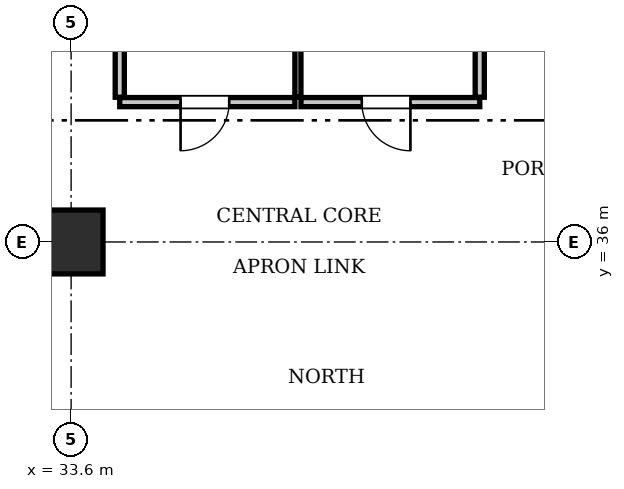
"""IFC4 building model, lengths in metres.
Left out: names, types, materials, properties, quantities, classifications, styles, units other than length and angle.
Written with IfcOpenShell. Run it as: python <this file> out.ifc"""

import sys

from ifc_helpers import new_model, si_unit, direction, frame, frame_2d, origin, origin_2d, place, context, subcontext, project, spatial, rectangle, extrude, element, fill, save


model = new_model("IFC4")
c1 = context("Model", 3, precision=1e-05, world=origin(), true_north=direction((0.0, 1.0)))
c2 = subcontext(c1, "Body", "Model", "MODEL_VIEW")
j1 = project(units=[si_unit("LENGTHUNIT", "METRE"), si_unit("PLANEANGLEUNIT", "RADIAN")], contexts=[c1])
p1 = place(None, origin())
s1 = spatial("IfcSite", under=j1, at=p1, CompositionType="ELEMENT")
p2 = place(p1, origin())
s2 = spatial("IfcBuilding", under=s1, at=p2, CompositionType="ELEMENT")
p3 = place(p2, frame((0.0, 0.0, 61.6)))
s3 = spatial("IfcBuildingStorey", under=s2, at=p3, CompositionType="ELEMENT", Elevation=61.6)
p4 = place(p3, frame((33.6, 36.0, 0.0), z_axis=(0.0, 0.0, 1.0), x_axis=(1.0, 0.0, 0.0)))
e1 = element("IfcColumn", 1, at=p4, inside=s3, PredefinedType="COLUMN", context=c2, shape_type="SweptSolid", body=[
    extrude(rectangle(XDim=1.05, YDim=1.05, at=origin_2d()), origin(), (0.0, 0.0, 1.0), 3.85),
])
p5 = place(p3, frame((34.4, 38.3, 0.0), z_axis=(0.0, 0.0, 1.0), x_axis=(1.0, 0.0, 0.0)))
e2 = element("IfcWall", 2, at=p5, inside=s3, PredefinedType="PARTITIONING", context=c2, shape_type="SweptSolid", body=[
    extrude(rectangle(XDim=2.88, YDim=0.15, at=frame_2d((1.44, 0.0))), origin(), (0.0, 0.0, 1.0), 3.61),
])
p6 = place(p5, frame((1.0, 0.0, 0.0)))
e3 = element("IfcOpeningElement", 3, at=p6, cuts=e2, PredefinedType="OPENING", context=c2, shape_type="SweptSolid", body=[
    extrude(rectangle(XDim=0.8, YDim=2.05, at=frame_2d((0.4, 1.025))), frame((0.0, 0.085, 0.0), z_axis=(0.0, -1.0, 0.0), x_axis=(1.0, 0.0, 0.0)), (0.0, 0.0, 1.0), 0.17),
])
p7 = place(p3, frame((37.38, 38.3, 0.0), z_axis=(0.0, 0.0, 1.0), x_axis=(1.0, 0.0, 0.0)))
e4 = element("IfcWall", 4, at=p7, inside=s3, PredefinedType="PARTITIONING", context=c2, shape_type="SweptSolid", body=[
    extrude(rectangle(XDim=2.94, YDim=0.15, at=frame_2d((1.47, 0.0))), origin(), (0.0, 0.0, 1.0), 3.61),
])
p8 = place(p7, frame((1.0, 0.0, 0.0)))
e5 = element("IfcOpeningElement", 5, at=p8, cuts=e4, PredefinedType="OPENING", context=c2, shape_type="SweptSolid", body=[
    extrude(rectangle(XDim=0.8, YDim=2.05, at=frame_2d((0.4, 1.025))), frame((0.0, 0.085, 0.0), z_axis=(0.0, -1.0, 0.0), x_axis=(1.0, 0.0, 0.0)), (0.0, 0.0, 1.0), 0.17),
])
p9 = place(p3, frame((34.4, 38.38, 0.0), z_axis=(0.0, 0.0, 1.0), x_axis=(0.0, 1.0, 0.0)))
e6 = element("IfcWall", 6, at=p9, inside=s3, PredefinedType="PARTITIONING", context=c2, shape_type="SweptSolid", body=[
    extrude(rectangle(XDim=2.84, YDim=0.15, at=frame_2d((1.42, 0.0))), origin(), (0.0, 0.0, 1.0), 3.61),
])
p10 = place(p3, frame((37.33, 38.38, 0.0), z_axis=(0.0, 0.0, 1.0), x_axis=(0.0, 1.0, 0.0)))
e7 = element("IfcWall", 7, at=p10, inside=s3, PredefinedType="PARTITIONING", context=c2, shape_type="SweptSolid", body=[
    extrude(rectangle(XDim=2.84, YDim=0.1, at=frame_2d((1.42, 0.0))), origin(), (0.0, 0.0, 1.0), 3.61),
])
p11 = place(p3, frame((40.32, 38.38, 0.0), z_axis=(0.0, 0.0, 1.0), x_axis=(0.0, 1.0, 0.0)))
e8 = element("IfcWall", 8, at=p11, inside=s3, PredefinedType="PARTITIONING", context=c2, shape_type="SweptSolid", body=[
    extrude(rectangle(XDim=2.84, YDim=0.15, at=frame_2d((1.42, 0.0))), origin(), (0.0, 0.0, 1.0), 3.61),
])
p12 = place(p6, frame((0.8, 0.0, 0.0), z_axis=(0.0, 0.0, 1.0), x_axis=(-1.0, 0.0, 0.0)))
e9 = element("IfcDoor", 9, at=p12, inside=s3, OperationType="SINGLE_SWING_RIGHT", PredefinedType="DOOR", context=c2, shape_type="SweptSolid", body=[
    extrude(rectangle(XDim=0.8, YDim=2.05, at=frame_2d((0.4, 1.025))), frame((0.0, 0.025, 0.0), z_axis=(0.0, -1.0, 0.0), x_axis=(1.0, 0.0, 0.0)), (0.0, 0.0, 1.0), 0.05),
])
fill(e3, e9)
p13 = place(p8, frame((0.8, 0.0, 0.0), z_axis=(0.0, 0.0, 1.0), x_axis=(-1.0, 0.0, 0.0)))
e10 = element("IfcDoor", 10, at=p13, inside=s3, OperationType="SINGLE_SWING_LEFT", PredefinedType="DOOR", context=c2, shape_type="SweptSolid", body=[
    extrude(rectangle(XDim=0.8, YDim=2.05, at=frame_2d((0.4, 1.025))), frame((0.0, 0.025, 0.0), z_axis=(0.0, -1.0, 0.0), x_axis=(1.0, 0.0, 0.0)), (0.0, 0.0, 1.0), 0.05),
])
fill(e5, e10)
save(model, sys.argv[1])
